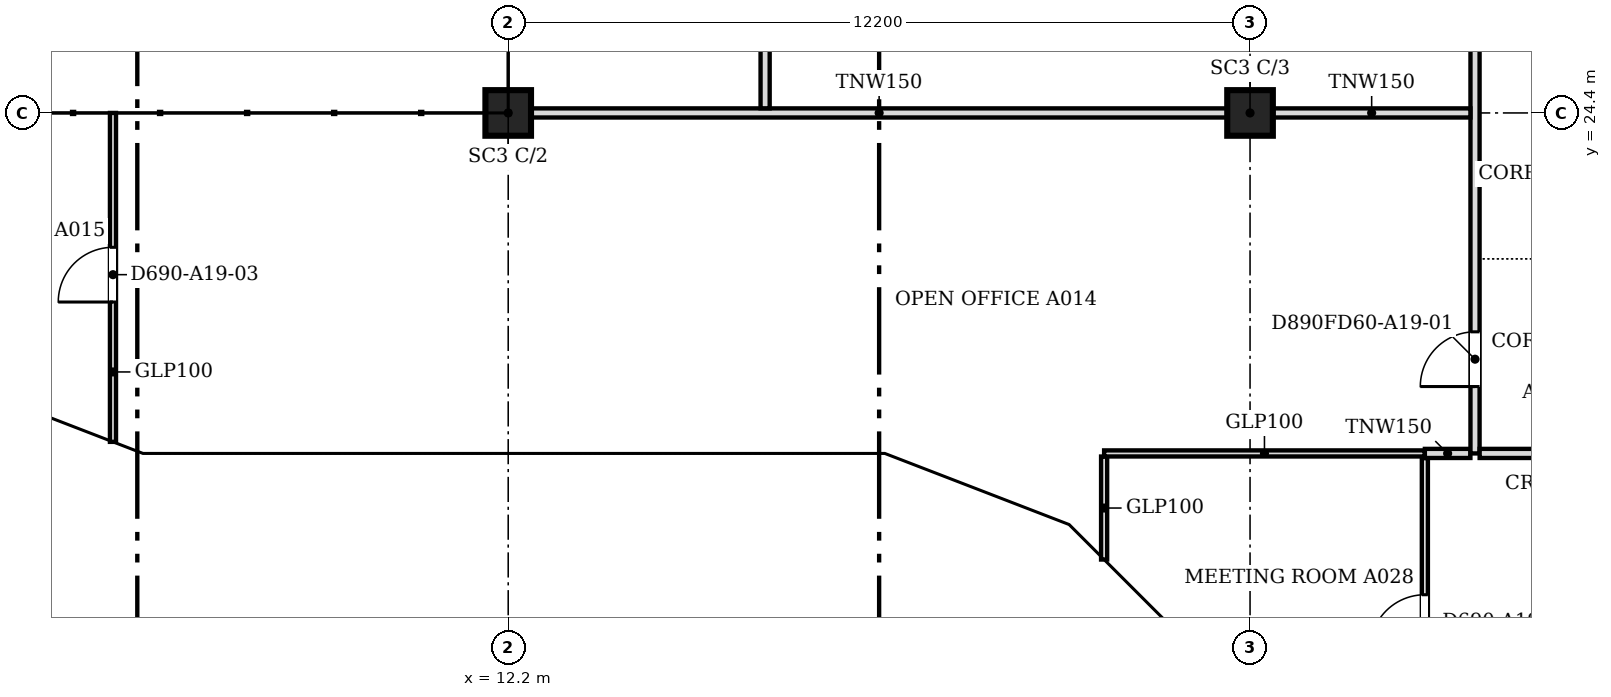
"""IFC4 building model, lengths in metres.
Left out: names, types, materials, properties, quantities, classifications, styles, units other than length and angle.
Written with IfcOpenShell. Run it as: python <this file> out.ifc"""

import sys

from ifc_helpers import new_model, si_unit, direction, frame, frame_2d, origin, origin_2d, place, context, subcontext, project, spatial, polyline, rectangle, outline, extrude, faceted_brep, source, transform, mapped, element, fill, save


model = new_model("IFC4")
c1 = context("Model", 3, precision=1e-05, world=origin(), true_north=direction((0.0, 1.0)))
c2 = subcontext(c1, "Body", "Model", "MODEL_VIEW")
j1 = project(units=[si_unit("LENGTHUNIT", "METRE"), si_unit("PLANEANGLEUNIT", "RADIAN")], contexts=[c1])
p1 = place(None, origin())
s1 = spatial("IfcSite", under=j1, at=p1, CompositionType="ELEMENT")
p2 = place(p1, origin())
s2 = spatial("IfcBuilding", under=s1, at=p2, CompositionType="ELEMENT")
p3 = place(p2, frame((0.0, 0.0, 216.9)))
s3 = spatial("IfcBuildingStorey", under=s2, at=p3, CompositionType="ELEMENT", Elevation=216.9)
for number, where, z_axis, x_axis in (
    (1, (12.2, 24.4, 0.0), (0.0, 0.0, 1.0), (1.0, 0.0, 0.0)),
    (2, (24.4, 24.4, 0.0), (0.0, 0.0, 1.0), (1.0, 0.0, 0.0)),
):
    element("IfcColumn", number, at=place(p3, frame(where, z_axis=z_axis, x_axis=x_axis)), inside=s3, PredefinedType="COLUMN", context=c2, shape_type="SweptSolid", body=[
        extrude(rectangle(XDim=0.75, YDim=0.75, at=origin_2d()), origin(), (0.0, 0.0, 1.0), 3.6),
    ])
m1 = source(origin(), c2, "Body", "Brep", [
    faceted_brep([(0.053, -0.25, 0.0), (3.003, -0.25, 3.8), (0.053, -0.25, 7.6), (0.0, -0.25, 7.531), (0.0, -0.25, 0.068), (0.106, 0.25, 7.532), (2.957, 0.25, 3.86), (2.957, 0.25, 3.74), (0.106, 0.25, 0.068), (3.003, 0.0, 3.8), (0.053, 0.0, 0.0), (0.053, 0.0, 7.6)], [[[0, 1, 2, 3, 4]], [[5, 6, 7, 8]], [[8, 7, 9, 1, 0, 10]], [[6, 5, 11, 2, 1, 9]], [[3, 2, 11]], [[10, 0, 4]], [[8, 10, 4, 3, 11, 5]], [[9, 7, 6]]]),
])
p4 = place(p3, frame((3.344, 19.631, -3.8), z_axis=(0.0, 0.0, 1.0), x_axis=(0.933007896601, -0.359855894603, 0.0)))
e3 = element("IfcWall", 3, at=p4, inside=s3, PredefinedType="SOLIDWALL", context=c2, shape_type="MappedRepresentation", body=[
    mapped(m1, transform((0.0, 0.0, 0.0), scale=1.0)),
])
m2 = source(origin(), c2, "Body", "SweptSolid", [
    extrude(outline(polyline([(0.253, 0.665), (2.687, 3.8), (0.253, 6.935), (0.253, 0.665)])), frame((0.0, 0.26, 0.0), z_axis=(0.0, -1.0, 0.0), x_axis=(1.0, 0.0, 0.0)), (0.0, 0.0, 1.0), 0.52),
])
p5 = place(p4, origin())
e4 = element("IfcOpeningElement", 4, at=p5, cuts=e3, PredefinedType="OPENING", context=c2, shape_type="MappedRepresentation", body=[
    mapped(m2, transform((0.0, 0.0, 0.0), scale=1.0)),
])
m3 = source(origin(), c2, "Body", "Brep", [
    faceted_brep([(3.003, -0.25, 0.0), (6.053, -0.25, 3.8), (3.003, -0.25, 7.6), (0.0, -0.25, 3.8), (0.047, 0.25, 3.859), (3.003, 0.25, 7.6), (6.053, 0.25, 3.8), (3.003, 0.25, 0.0), (0.047, 0.25, 3.741), (0.0, 0.0, 3.8)], [[[0, 1, 2, 3]], [[4, 5, 6, 7, 8]], [[7, 6, 1, 0]], [[6, 5, 2, 1]], [[5, 4, 9, 3, 2]], [[8, 7, 0, 3, 9]], [[8, 9, 4]]]),
])
p6 = place(p3, frame((6.146, 18.55, -3.8), z_axis=(0.0, 0.0, 1.0), x_axis=(1.0, 0.0, 0.0)))
e5 = element("IfcWall", 5, at=p6, inside=s3, PredefinedType="SOLIDWALL", context=c2, shape_type="MappedRepresentation", body=[
    mapped(m3, transform((0.0, 0.0, 0.0), scale=1.0)),
])
m4 = source(origin(), c2, "Body", "SweptSolid", [
    extrude(outline(polyline([(3.005, 0.401), (5.733, 3.8), (3.005, 7.199), (0.319, 3.8), (3.005, 0.401)])), frame((0.0, 0.26, 0.0), z_axis=(0.0, -1.0, 0.0), x_axis=(1.0, 0.0, 0.0)), (0.0, 0.0, 1.0), 0.52),
])
p7 = place(p6, origin())
e6 = element("IfcOpeningElement", 6, at=p7, cuts=e5, PredefinedType="OPENING", context=c2, shape_type="MappedRepresentation", body=[
    mapped(m4, transform((0.0, 0.0, 0.0), scale=1.0)),
])
m5 = source(origin(), c2, "Body", "Brep", [
    faceted_brep([(3.05, -0.25, 0.0), (6.1, -0.25, 3.743), (6.1, -0.25, 3.857), (3.05, -0.25, 7.6), (0.0, -0.25, 3.8), (0.0, 0.25, 3.8), (3.05, 0.25, 7.6), (6.146, 0.25, 3.8), (3.05, 0.25, 0.0), (6.146, -0.0, 3.8)], [[[0, 1, 2, 3, 4]], [[5, 6, 7, 8]], [[8, 7, 9, 1, 0]], [[7, 6, 3, 2, 9]], [[6, 5, 4, 3]], [[5, 8, 0, 4]], [[1, 9, 2]]]),
])
p8 = place(p3, frame((12.2, 18.55, -3.8), z_axis=(0.0, 0.0, 1.0), x_axis=(1.0, 0.0, 0.0)))
e7 = element("IfcWall", 7, at=p8, inside=s3, PredefinedType="SOLIDWALL", context=c2, shape_type="MappedRepresentation", body=[
    mapped(m5, transform((0.0, 0.0, 0.0), scale=1.0)),
])
m6 = source(origin(), c2, "Body", "SweptSolid", [
    extrude(outline(polyline([(3.052, 0.397), (5.824, 3.8), (3.052, 7.202), (0.321, 3.8), (3.052, 0.397)])), frame((0.0, 0.26, 0.0), z_axis=(0.0, -1.0, 0.0), x_axis=(1.0, 0.0, 0.0)), (0.0, 0.0, 1.0), 0.52),
])
p9 = place(p8, origin())
e8 = element("IfcOpeningElement", 8, at=p9, cuts=e7, PredefinedType="OPENING", context=c2, shape_type="MappedRepresentation", body=[
    mapped(m6, transform((0.0, 0.0, 0.0), scale=1.0)),
])
m7 = source(origin(), c2, "Body", "Brep", [
    faceted_brep([(3.096, -0.25, 7.536), (0.047, -0.25, 3.856), (0.047, -0.25, 3.744), (3.096, -0.25, 0.064), (0.0, 0.25, 3.8), (3.149, 0.25, 7.6), (3.202, 0.25, 7.536), (3.202, 0.25, 0.064), (3.149, 0.25, 0.0), (3.149, -0.0, 0.0), (3.149, -0.0, 7.6), (0.0, 0.0, 3.8)], [[[0, 1, 2, 3]], [[4, 5, 6, 7, 8]], [[8, 7, 9]], [[6, 5, 10]], [[5, 4, 11, 1, 0, 10]], [[4, 8, 9, 3, 2, 11]], [[11, 2, 1]], [[3, 9, 7, 6, 10, 0]]]),
])
p10 = place(p3, frame((18.346, 18.55, -3.8), z_axis=(0.0, 0.0, 1.0), x_axis=(0.932985567668, -0.359913782069, 0.0)))
e9 = element("IfcWall", 9, at=p10, inside=s3, PredefinedType="SOLIDWALL", context=c2, shape_type="MappedRepresentation", body=[
    mapped(m7, transform((0.0, 0.0, 0.0), scale=1.0)),
])
m8 = source(origin(), c2, "Body", "SweptSolid", [
    extrude(outline(polyline([(2.949, 6.967), (0.325, 3.8), (2.949, 0.633), (2.949, 6.967)])), frame((0.0, 0.26, 0.0), z_axis=(0.0, -1.0, 0.0), x_axis=(1.0, 0.0, 0.0)), (0.0, 0.0, 1.0), 0.52),
])
p11 = place(p10, origin())
e10 = element("IfcOpeningElement", 10, at=p11, cuts=e9, PredefinedType="OPENING", context=c2, shape_type="MappedRepresentation", body=[
    mapped(m8, transform((0.0, 0.0, 0.0), scale=1.0)),
])
m9 = source(origin(), c2, "Body", "Brep", [
    faceted_brep([(0.106, -0.25, 0.064), (3.156, -0.25, 3.736), (3.156, -0.25, 3.864), (0.106, -0.25, 7.536), (0.0, 0.25, 7.536), (0.053, 0.25, 7.6), (3.209, 0.25, 3.8), (0.053, 0.25, 0.0), (0.0, 0.25, 0.064), (3.209, -0.0, 3.8), (0.053, 0.0, 0.0), (0.053, 0.0, 7.6)], [[[0, 1, 2, 3]], [[4, 5, 6, 7, 8]], [[7, 6, 9, 1, 0, 10]], [[6, 5, 11, 3, 2, 9]], [[5, 4, 11]], [[8, 7, 10]], [[8, 10, 0, 3, 11, 4]], [[1, 9, 2]]]),
])
p12 = place(p3, frame((21.248, 17.454, -3.8), z_axis=(0.0, 0.0, 1.0), x_axis=(0.707106781187, -0.707106781187, 0.0)))
e11 = element("IfcWall", 11, at=p12, inside=s3, PredefinedType="SOLIDWALL", context=c2, shape_type="MappedRepresentation", body=[
    mapped(m9, transform((0.0, 0.0, 0.0), scale=1.0)),
])
m10 = source(origin(), c2, "Body", "SweptSolid", [
    extrude(outline(polyline([(0.253, 0.632), (2.884, 3.8), (0.253, 6.968), (0.253, 0.632)])), frame((0.0, 0.26, 0.0), z_axis=(0.0, -1.0, 0.0), x_axis=(1.0, 0.0, 0.0)), (0.0, 0.0, 1.0), 0.52),
])
p13 = place(p12, origin())
e12 = element("IfcOpeningElement", 12, at=p13, cuts=e11, PredefinedType="OPENING", context=c2, shape_type="MappedRepresentation", body=[
    mapped(m10, transform((0.0, 0.0, 0.0), scale=1.0)),
])
p14 = place(p2, frame((0.0, 0.0, 220.7)))
s4 = spatial("IfcBuildingStorey", under=s2, at=p14, CompositionType="ELEMENT", Elevation=220.7)
m11 = source(origin(), c2, "Body", "Brep", [
    faceted_brep([(2.95, -0.25, 0.0), (2.997, -0.25, 0.059), (2.997, -0.25, 7.541), (2.95, -0.25, 7.6), (0.0, -0.25, 3.8), (0.053, 0.25, 3.868), (2.904, 0.25, 7.54), (2.904, 0.25, 0.06), (0.053, 0.25, 3.732), (2.95, 0.0, 0.0), (2.95, 0.0, 7.6), (0.0, 0.0, 3.8)], [[[0, 1, 2, 3, 4]], [[5, 6, 7, 8]], [[1, 0, 9]], [[10, 3, 2]], [[6, 5, 11, 4, 3, 10]], [[8, 7, 9, 0, 4, 11]], [[8, 11, 5]], [[1, 9, 7, 6, 10, 2]]]),
])
p15 = place(p14, frame((3.394, 19.612, -3.8), z_axis=(0.0, 0.0, 1.0), x_axis=(0.932990326376, -0.359901446078, 0.0)))
e13 = element("IfcWall", 13, at=p15, inside=s4, PredefinedType="SOLIDWALL", context=c2, shape_type="MappedRepresentation", body=[
    mapped(m11, transform((0.0, 0.0, 0.0), scale=1.0)),
])
m12 = source(origin(), c2, "Body", "SweptSolid", [
    extrude(outline(polyline([(2.75, 6.935), (0.316, 3.8), (2.75, 0.665), (2.75, 6.935)])), frame((0.0, 0.26, 0.0), z_axis=(0.0, -1.0, 0.0), x_axis=(1.0, 0.0, 0.0)), (0.0, 0.0, 1.0), 0.52),
])
p16 = place(p15, origin())
e14 = element("IfcOpeningElement", 14, at=p16, cuts=e13, PredefinedType="OPENING", context=c2, shape_type="MappedRepresentation", body=[
    mapped(m12, transform((0.0, 0.0, 0.0), scale=1.0)),
])
m13 = source(origin(), c2, "Body", "Brep", [
    faceted_brep([(0.047, -0.25, 0.0), (3.05, -0.25, 3.8), (0.047, -0.25, 7.6), (0.0, -0.25, 7.54), (0.0, -0.25, 0.06), (0.093, 0.25, 7.541), (3.05, 0.25, 3.8), (0.093, 0.25, 0.059), (0.047, 0.0, 0.0), (0.047, 0.0, 7.6)], [[[0, 1, 2, 3, 4]], [[5, 6, 7]], [[7, 6, 1, 0, 8]], [[6, 5, 9, 2, 1]], [[3, 2, 9]], [[8, 0, 4]], [[7, 8, 4, 3, 9, 5]]]),
])
p17 = place(p14, frame((6.1, 18.55, -3.8), z_axis=(0.0, 0.0, 1.0), x_axis=(1.0, 0.0, 0.0)))
e15 = element("IfcWall", 15, at=p17, inside=s4, PredefinedType="SOLIDWALL", context=c2, shape_type="MappedRepresentation", body=[
    mapped(m13, transform((0.0, 0.0, 0.0), scale=1.0)),
])
m14 = source(origin(), c2, "Body", "SweptSolid", [
    extrude(outline(polyline([(0.247, 0.656), (2.731, 3.8), (0.247, 6.944), (0.247, 0.656)])), frame((0.0, 0.26, 0.0), z_axis=(0.0, -1.0, 0.0), x_axis=(1.0, 0.0, 0.0)), (0.0, 0.0, 1.0), 0.52),
])
p18 = place(p17, origin())
e16 = element("IfcOpeningElement", 16, at=p18, cuts=e15, PredefinedType="OPENING", context=c2, shape_type="MappedRepresentation", body=[
    mapped(m14, transform((0.0, 0.0, 0.0), scale=1.0)),
])
m15 = source(origin(), c2, "Body", "SweptSolid", [
    extrude(outline(polyline([(3.05, 0.0), (6.1, 3.8), (3.05, 7.6), (0.0, 3.8), (3.05, 0.0)])), frame((0.0, 0.25, 0.0), z_axis=(0.0, -1.0, 0.0), x_axis=(1.0, 0.0, 0.0)), (0.0, 0.0, 1.0), 0.5),
])
p19 = place(p14, frame((9.15, 18.55, -3.8), z_axis=(0.0, 0.0, 1.0), x_axis=(1.0, 0.0, 0.0)))
e17 = element("IfcWall", 17, at=p19, inside=s4, PredefinedType="SOLIDWALL", context=c2, shape_type="MappedRepresentation", body=[
    mapped(m15, transform((0.0, 0.0, 0.0), scale=1.0)),
])
m16 = source(origin(), c2, "Body", "SweptSolid", [
    extrude(outline(polyline([(3.05, 0.399), (5.78, 3.8), (3.05, 7.201), (0.321, 3.8), (3.05, 0.399)])), frame((0.0, 0.26, 0.0), z_axis=(0.0, -1.0, 0.0), x_axis=(1.0, 0.0, 0.0)), (0.0, 0.0, 1.0), 0.52),
])
p20 = place(p19, origin())
e18 = element("IfcOpeningElement", 18, at=p20, cuts=e17, PredefinedType="OPENING", context=c2, shape_type="MappedRepresentation", body=[
    mapped(m16, transform((0.0, 0.0, 0.0), scale=1.0)),
])
m17 = source(origin(), c2, "Body", "Brep", [
    faceted_brep([(3.05, -0.25, 7.543), (0.0, -0.25, 3.8), (3.05, -0.25, 0.057), (0.0, 0.25, 3.8), (3.096, 0.25, 7.6), (3.143, 0.25, 7.544), (3.143, 0.25, 0.056), (3.096, 0.25, 0.0), (3.096, -0.0, 0.0), (3.096, -0.0, 7.6)], [[[0, 1, 2]], [[3, 4, 5, 6, 7]], [[7, 6, 8]], [[5, 4, 9]], [[4, 3, 1, 0, 9]], [[3, 7, 8, 2, 1]], [[2, 8, 6, 5, 9, 0]]]),
])
p21 = place(p14, frame((15.25, 18.55, -3.8), z_axis=(0.0, 0.0, 1.0), x_axis=(1.0, 0.0, 0.0)))
e19 = element("IfcWall", 19, at=p21, inside=s4, PredefinedType="SOLIDWALL", context=c2, shape_type="MappedRepresentation", body=[
    mapped(m17, transform((0.0, 0.0, 0.0), scale=1.0)),
])
m18 = source(origin(), c2, "Body", "SweptSolid", [
    extrude(outline(polyline([(2.896, 6.959), (0.323, 3.8), (2.896, 0.641), (2.896, 6.959)])), frame((0.0, 0.26, 0.0), z_axis=(0.0, -1.0, 0.0), x_axis=(1.0, 0.0, 0.0)), (0.0, 0.0, 1.0), 0.52),
])
p22 = place(p21, origin())
e20 = element("IfcOpeningElement", 20, at=p22, cuts=e19, PredefinedType="OPENING", context=c2, shape_type="MappedRepresentation", body=[
    mapped(m18, transform((0.0, 0.0, 0.0), scale=1.0)),
])
m19 = source(origin(), c2, "Body", "Brep", [
    faceted_brep([(0.093, -0.25, 0.056), (3.143, -0.25, 3.736), (3.143, -0.25, 3.864), (0.093, -0.25, 7.544), (0.0, 0.25, 7.543), (0.047, 0.25, 7.6), (3.196, 0.25, 3.8), (0.047, 0.25, 0.0), (0.0, 0.25, 0.057), (3.196, -0.0, 3.8), (0.047, 0.0, 0.0), (0.047, 0.0, 7.6)], [[[0, 1, 2, 3]], [[4, 5, 6, 7, 8]], [[7, 6, 9, 1, 0, 10]], [[6, 5, 11, 3, 2, 9]], [[5, 4, 11]], [[8, 7, 10]], [[8, 10, 0, 3, 11, 4]], [[1, 9, 2]]]),
])
p23 = place(p14, frame((18.303, 18.567, -3.8), z_axis=(0.0, 0.0, 1.0), x_axis=(0.932978940178, -0.359930961693, 0.0)))
e21 = element("IfcWall", 21, at=p23, inside=s4, PredefinedType="SOLIDWALL", context=c2, shape_type="MappedRepresentation", body=[
    mapped(m19, transform((0.0, 0.0, 0.0), scale=1.0)),
])
m20 = source(origin(), c2, "Body", "SweptSolid", [
    extrude(outline(polyline([(0.247, 0.633), (2.871, 3.8), (0.247, 6.967), (0.247, 0.633)])), frame((0.0, 0.26, 0.0), z_axis=(0.0, -1.0, 0.0), x_axis=(1.0, 0.0, 0.0)), (0.0, 0.0, 1.0), 0.52),
])
p24 = place(p23, origin())
e22 = element("IfcOpeningElement", 22, at=p24, cuts=e21, PredefinedType="OPENING", context=c2, shape_type="MappedRepresentation", body=[
    mapped(m20, transform((0.0, 0.0, 0.0), scale=1.0)),
])
m21 = source(origin(), c2, "Body", "Brep", [
    faceted_brep([(3.103, -0.25, 7.536), (0.053, -0.25, 3.864), (0.053, -0.25, 3.736), (3.103, -0.25, 0.064), (0.0, 0.25, 3.8), (3.156, 0.25, 7.6), (3.209, 0.25, 7.536), (3.209, 0.25, 0.064), (3.156, 0.25, 0.0), (3.156, -0.0, 0.0), (3.156, -0.0, 7.6), (0.0, 0.0, 3.8)], [[[0, 1, 2, 3]], [[4, 5, 6, 7, 8]], [[8, 7, 9]], [[6, 5, 10]], [[5, 4, 11, 1, 0, 10]], [[4, 8, 9, 3, 2, 11]], [[11, 2, 1]], [[3, 9, 7, 6, 10, 0]]]),
])
p25 = place(p14, frame((21.285, 17.417, -3.8), z_axis=(0.0, 0.0, 1.0), x_axis=(0.707106781187, -0.707106781187, 0.0)))
e23 = element("IfcWall", 23, at=p25, inside=s4, PredefinedType="SOLIDWALL", context=c2, shape_type="MappedRepresentation", body=[
    mapped(m21, transform((0.0, 0.0, 0.0), scale=1.0)),
])
m22 = source(origin(), c2, "Body", "SweptSolid", [
    extrude(outline(polyline([(2.956, 6.968), (0.325, 3.8), (2.956, 0.632), (2.956, 6.968)])), frame((0.0, 0.26, 0.0), z_axis=(0.0, -1.0, 0.0), x_axis=(1.0, 0.0, 0.0)), (0.0, 0.0, 1.0), 0.52),
])
p26 = place(p25, origin())
e24 = element("IfcOpeningElement", 24, at=p26, cuts=e23, PredefinedType="OPENING", context=c2, shape_type="MappedRepresentation", body=[
    mapped(m22, transform((0.0, 0.0, 0.0), scale=1.0)),
])
p27 = place(p3, frame((27.275, 13.276, 0.0), z_axis=(0.0, 0.0, 1.0), x_axis=(0.0, 1.0, 0.0)))
e25 = element("IfcWall", 25, at=p27, inside=s3, PredefinedType="PARTITIONING", context=c2, shape_type="SweptSolid", body=[
    extrude(rectangle(XDim=5.448, YDim=0.1, at=frame_2d((2.724, 0.0))), origin(), (0.0, 0.0, 1.0), 3.067),
])
m23 = source(origin(), c2, "Body", "SweptSolid", [
    extrude(rectangle(XDim=0.9, YDim=2.1, at=frame_2d((0.45, 1.05))), frame((0.0, 0.06, 0.0), z_axis=(0.0, -1.0, 0.0), x_axis=(1.0, 0.0, 0.0)), (0.0, 0.0, 1.0), 0.12),
])
p28 = place(p27, frame((2.3, 0.0, 0.0)))
e26 = element("IfcOpeningElement", 26, at=p28, cuts=e25, PredefinedType="OPENING", context=c2, shape_type="MappedRepresentation", body=[
    mapped(m23, transform((0.0, 0.0, 0.0), scale=1.0)),
])
p29 = place(p3, frame((22.0, 17.055, 0.0), z_axis=(0.0, 0.0, 1.0), x_axis=(0.0, 1.0, 0.0)))
e27 = element("IfcWall", 27, at=p29, inside=s3, PredefinedType="PARTITIONING", context=c2, shape_type="SweptSolid", body=[
    extrude(rectangle(XDim=1.694, YDim=0.1, at=frame_2d((0.847, 0.0))), origin(), (0.0, 0.0, 1.0), 3.067),
])
p30 = place(p3, frame((22.0, 18.8, 0.0), z_axis=(0.0, 0.0, 1.0), x_axis=(1.0, 0.0, 0.0)))
e28 = element("IfcWall", 28, at=p30, inside=s3, PredefinedType="PARTITIONING", context=c2, shape_type="SweptSolid", body=[
    extrude(rectangle(XDim=5.274, YDim=0.1, at=frame_2d((2.637, 0.0))), origin(), (0.0, 0.0, 1.0), 3.067),
])
p31 = place(p3, frame((27.275, 18.8, 0.0), z_axis=(0.0, 0.0, 1.0), x_axis=(1.0, 0.0, 0.0)))
e29 = element("IfcWall", 29, at=p31, inside=s3, PredefinedType="PARTITIONING", context=c2, shape_type="SweptSolid", body=[
    extrude(rectangle(XDim=0.749, YDim=0.15, at=frame_2d((0.375, 0.0))), origin(), (0.0, 0.0, 1.0), 3.067),
])
p32 = place(p3, frame((28.1, 18.8, 0.0), z_axis=(0.0, 0.0, 1.0), x_axis=(0.0, 1.0, 0.0)))
e30 = element("IfcWall", 30, at=p32, inside=s3, PredefinedType="PARTITIONING", context=c2, shape_type="SweptSolid", body=[
    extrude(rectangle(XDim=26.024, YDim=0.15, at=frame_2d((13.012, 0.0))), origin(), (0.0, 0.0, 1.0), 3.067),
])
m24 = source(origin(), c2, "Body", "SweptSolid", [
    extrude(rectangle(XDim=0.9, YDim=2.1, at=frame_2d((0.45, 1.05))), frame((0.0, 0.085, 0.0), z_axis=(0.0, -1.0, 0.0), x_axis=(1.0, 0.0, 0.0)), (0.0, 0.0, 1.0), 0.17),
])
p33 = place(p32, frame((1.1, 0.0, 0.0)))
e31 = element("IfcOpeningElement", 31, at=p33, cuts=e30, PredefinedType="OPENING", context=c2, shape_type="MappedRepresentation", body=[
    mapped(m24, transform((0.0, 0.0, 0.0), scale=1.0)),
])
m25 = source(origin(), c2, "Body", "SweptSolid", [
    extrude(rectangle(XDim=1.0, YDim=2.1, at=frame_2d((0.5, 1.05))), frame((0.0, 0.085, 0.0), z_axis=(0.0, -1.0, 0.0), x_axis=(1.0, 0.0, 0.0)), (0.0, 0.0, 1.0), 0.17),
])
p34 = place(p32, frame((14.201, 0.0, 0.0)))
e32 = element("IfcOpeningElement", 32, at=p34, cuts=e30, PredefinedType="OPENING", context=c2, shape_type="MappedRepresentation", body=[
    mapped(m25, transform((0.0, 0.0, 0.0), scale=1.0)),
])
p35 = place(p32, frame((8.1, 0.0, 0.0)))
e33 = element("IfcOpeningElement", 33, at=p35, cuts=e30, PredefinedType="OPENING", context=c2, shape_type="MappedRepresentation", body=[
    mapped(m25, transform((0.0, 0.0, 0.0), scale=1.0)),
])
p36 = place(p32, frame((21.5, 0.0, 0.0)))
e34 = element("IfcOpeningElement", 34, at=p36, cuts=e30, PredefinedType="OPENING", context=c2, shape_type="MappedRepresentation", body=[
    mapped(m24, transform((0.0, 0.0, 0.0), scale=1.0)),
])
p37 = place(p3, frame((28.176, 18.8, 0.0), z_axis=(0.0, 0.0, 1.0), x_axis=(1.0, 0.0, 0.0)))
e35 = element("IfcWall", 35, at=p37, inside=s3, PredefinedType="PARTITIONING", context=c2, shape_type="SweptSolid", body=[
    extrude(rectangle(XDim=2.248, YDim=0.15, at=frame_2d((1.124, 0.0))), origin(), (0.0, 0.0, 1.0), 3.067),
])
p38 = place(p3, frame((5.7, 18.99, 0.0), z_axis=(0.0, 0.0, 1.0), x_axis=(0.0, 1.0, 0.0)))
e36 = element("IfcWall", 36, at=p38, inside=s3, PredefinedType="PARTITIONING", context=c2, shape_type="SweptSolid", body=[
    extrude(rectangle(XDim=5.41, YDim=0.1, at=frame_2d((2.705, 0.0))), origin(), (0.0, 0.0, 1.0), 3.067),
])
p39 = place(p38, frame((2.3, 0.0, 0.0)))
e37 = element("IfcOpeningElement", 37, at=p39, cuts=e36, PredefinedType="OPENING", context=c2, shape_type="MappedRepresentation", body=[
    mapped(m23, transform((0.0, 0.0, 0.0), scale=1.0)),
])
p40 = place(p3, frame((12.576, 24.4, 0.0), z_axis=(0.0, 0.0, 1.0), x_axis=(1.0, 0.0, 0.0)))
e38 = element("IfcWall", 38, at=p40, inside=s3, PredefinedType="PARTITIONING", context=c2, shape_type="SweptSolid", body=[
    extrude(rectangle(XDim=11.448, YDim=0.15, at=frame_2d((5.724, 0.0))), origin(), (0.0, 0.0, 1.0), 3.067),
])
p41 = place(p3, frame((24.776, 24.4, 0.0), z_axis=(0.0, 0.0, 1.0), x_axis=(1.0, 0.0, 0.0)))
e39 = element("IfcWall", 39, at=p41, inside=s3, PredefinedType="PARTITIONING", context=c2, shape_type="SweptSolid", body=[
    extrude(rectangle(XDim=3.248, YDim=0.15, at=frame_2d((1.624, 0.0))), origin(), (0.0, 0.0, 1.0), 3.067),
])
p42 = place(p3, frame((16.425, 24.476, 0.0), z_axis=(0.0, 0.0, 1.0), x_axis=(0.0, 1.0, 0.0)))
e40 = element("IfcWall", 40, at=p42, inside=s3, PredefinedType="PARTITIONING", context=c2, shape_type="SweptSolid", body=[
    extrude(rectangle(XDim=5.948, YDim=0.15, at=frame_2d((2.974, 0.0))), origin(), (0.0, 0.0, 1.0), 3.067),
])
p43 = place(p42, frame((2.5, 0.0, 0.0)))
e41 = element("IfcOpeningElement", 41, at=p43, cuts=e40, PredefinedType="OPENING", context=c2, shape_type="MappedRepresentation", body=[
    mapped(m24, transform((0.0, 0.0, 0.0), scale=1.0)),
])
m26 = source(origin(), c2, "Body", "SweptSolid", [
    extrude(rectangle(XDim=0.9, YDim=2.1, at=frame_2d((0.45, 1.05))), frame((0.0, 0.025, 0.0), z_axis=(0.0, -1.0, 0.0), x_axis=(1.0, 0.0, 0.0)), (0.0, 0.0, 1.0), 0.05),
])
p44 = place(p33, origin())
e42 = element("IfcDoor", 42, at=p44, inside=s3, OperationType="SINGLE_SWING_LEFT", PredefinedType="DOOR", context=c2, shape_type="MappedRepresentation", body=[
    mapped(m26, transform((0.0, 0.0, 0.0), scale=1.0)),
])
fill(e31, e42)
p45 = place(p39, origin())
e43 = element("IfcDoor", 43, at=p45, inside=s3, OperationType="SINGLE_SWING_LEFT", PredefinedType="DOOR", context=c2, shape_type="MappedRepresentation", body=[
    mapped(m26, transform((0.0, 0.0, 0.0), scale=1.0)),
])
fill(e37, e43)
p46 = place(p28, origin())
e44 = element("IfcDoor", 44, at=p46, inside=s3, OperationType="SINGLE_SWING_LEFT", PredefinedType="DOOR", context=c2, shape_type="MappedRepresentation", body=[
    mapped(m26, transform((0.0, 0.0, 0.0), scale=1.0)),
])
fill(e26, e44)
save(model, sys.argv[1])
